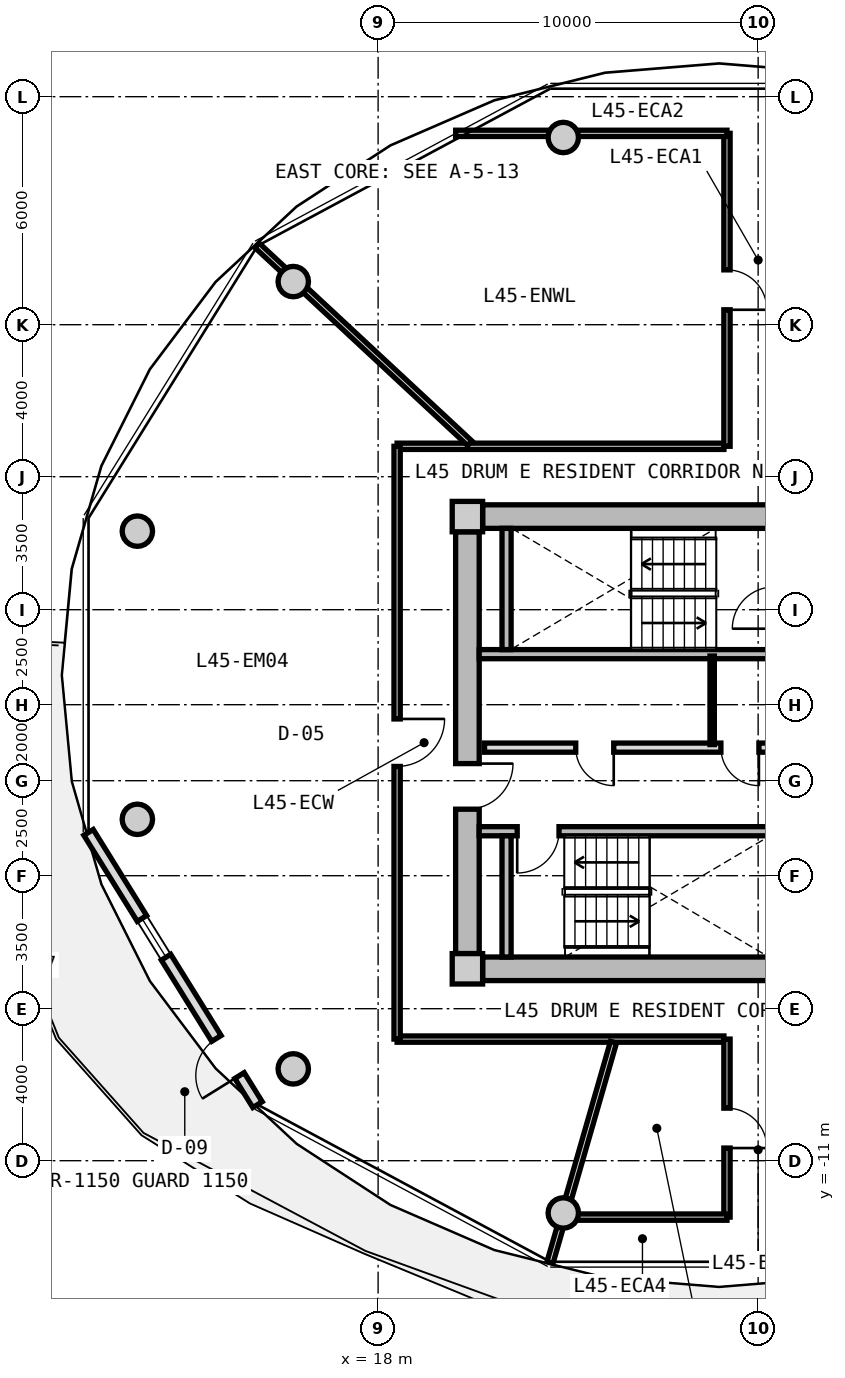
"""IFC4 building model, lengths in metres.
Left out: names, types, materials, properties, quantities, classifications, styles, units other than length and angle.
Written with IfcOpenShell. Run it as: python <this file> out.ifc"""

import sys

from ifc_helpers import new_model, si_unit, direction, frame, frame_2d, origin, origin_2d, place, context, subcontext, project, spatial, rectangle, circle, extrude, source, transform, mapped, element, fill, save


model = new_model("IFC4")
c1 = context("Model", 3, precision=1e-05, world=origin(), true_north=direction((0.0, 1.0)))
c2 = subcontext(c1, "Body", "Model", "MODEL_VIEW")
j1 = project(units=[si_unit("LENGTHUNIT", "METRE"), si_unit("PLANEANGLEUNIT", "RADIAN")], contexts=[c1])
p1 = place(None, origin())
s1 = spatial("IfcSite", under=j1, at=p1, CompositionType="ELEMENT")
p2 = place(p1, origin())
s2 = spatial("IfcBuilding", under=s1, at=p2, CompositionType="ELEMENT")
p3 = place(p2, frame((0.0, 0.0, 146.5)))
s3 = spatial("IfcBuildingStorey", under=s2, at=p3, CompositionType="ELEMENT", Elevation=146.5)
m1 = source(origin(), c2, "Body", "SweptSolid", [
    extrude(rectangle(XDim=0.8, YDim=0.8, at=origin_2d()), origin(), (0.0, 0.0, 1.0), 3.05),
])
for number, where, z_axis, x_axis in (
    (1, (20.35, -5.95, 0.0), (0.0, 0.0, 1.0), (1.0, 0.0, 0.0)),
    (2, (20.35, 5.95, 0.0), (0.0, 0.0, 1.0), (1.0, 0.0, 0.0)),
):
    element("IfcColumn", number, at=place(p3, frame(where, z_axis=z_axis, x_axis=x_axis)), inside=s3, PredefinedType="COLUMN", context=c2, shape_type="MappedRepresentation", body=[
        mapped(m1, transform((0.0, 0.0, 0.0), x_axis=(1.0, 0.0, 0.0), y_axis=(0.0, 1.0, 0.0), z_axis=(0.0, 0.0, 1.0), scale=1.0)),
    ])
m2 = source(origin(), c2, "Body", "SweptSolid", [
    extrude(rectangle(XDim=14.5, YDim=0.62, at=frame_2d((7.25, 0.0))), origin(), (0.0, 0.0, 1.0), 2.81),
])
for number, where, z_axis, x_axis in (
    (3, (20.75, 5.95, 0.0), (0.0, 0.0, 1.0), (1.0, 0.0, 0.0)),
    (4, (35.25, -5.95, 0.0), (0.0, 0.0, 1.0), (-1.0, 0.0, 0.0)),
):
    element("IfcWall", number, at=place(p3, frame(where, z_axis=z_axis, x_axis=x_axis)), inside=s3, PredefinedType="SHEAR", context=c2, shape_type="MappedRepresentation", body=[
        mapped(m2, transform((0.0, 0.0, 0.0), x_axis=(1.0, 0.0, 0.0), y_axis=(0.0, 1.0, 0.0), z_axis=(0.0, 0.0, 1.0), scale=1.0)),
    ])
m3 = source(origin(), c2, "Body", "SweptSolid", [
    extrude(rectangle(XDim=11.1, YDim=0.62, at=frame_2d((5.55, 0.0))), origin(), (0.0, 0.0, 1.0), 2.81),
])
p4 = place(p3, frame((20.35, -5.55, 0.0), z_axis=(0.0, 0.0, 1.0), x_axis=(0.0, 1.0, 0.0)))
e5 = element("IfcWall", 5, at=p4, inside=s3, PredefinedType="SHEAR", context=c2, shape_type="MappedRepresentation", body=[
    mapped(m3, transform((0.0, 0.0, 0.0), x_axis=(1.0, 0.0, 0.0), y_axis=(0.0, 1.0, 0.0), z_axis=(0.0, 0.0, 1.0), scale=1.0)),
])
p5 = place(p4, frame((3.8, 0.0, 0.0)))
e6 = element("IfcOpeningElement", 6, at=p5, cuts=e5, PredefinedType="OPENING", context=c2, shape_type="SweptSolid", body=[
    extrude(rectangle(XDim=1.2, YDim=2.15, at=frame_2d((0.6, 1.075))), frame((0.0, 0.32, 0.0), z_axis=(0.0, -1.0, 0.0), x_axis=(1.0, 0.0, 0.0)), (0.0, 0.0, 1.0), 0.64),
])
m4 = source(origin(), c2, "Body", "SweptSolid", [
    extrude(circle(Radius=0.4, at=origin_2d()), origin(), (0.0, 0.0, 1.0), 3.05),
])
for number, where, z_axis, x_axis in (
    (7, (22.873, 15.926, 0.0), (0.0, 0.0, 1.0), (1.0, 0.0, 0.0)),
    (8, (15.767, 12.135, 0.0), (0.0, 0.0, 1.0), (1.0, 0.0, 0.0)),
    (9, (11.665, 5.567, 0.0), (0.0, 0.0, 1.0), (1.0, 0.0, 0.0)),
    (10, (11.665, -2.016, 0.0), (0.0, 0.0, 1.0), (1.0, 0.0, 0.0)),
    (11, (15.767, -8.584, 0.0), (0.0, 0.0, 1.0), (1.0, 0.0, 0.0)),
    (12, (22.873, -12.375, 0.0), (0.0, 0.0, 1.0), (1.0, 0.0, 0.0)),
):
    element("IfcColumn", number, at=place(p3, frame(where, z_axis=z_axis, x_axis=x_axis)), inside=s3, PredefinedType="COLUMN", context=c2, shape_type="MappedRepresentation", body=[
        mapped(m4, transform((0.0, 0.0, 0.0), x_axis=(1.0, 0.0, 0.0), y_axis=(0.0, 1.0, 0.0), z_axis=(0.0, 0.0, 1.0), scale=1.0)),
    ])
m5 = source(origin(), c2, "Body", "SweptSolid", [
    extrude(rectangle(XDim=8.431, YDim=0.29, at=frame_2d((4.216, 0.0))), origin(), (0.0, 0.0, 1.0), 2.81),
])
p6 = place(p3, frame((14.827, -9.524, 0.0), z_axis=(0.0, 0.0, 1.0), x_axis=(-0.527377998418, 0.849630770855, 0.0)))
e13 = element("IfcWall", 13, at=p6, inside=s3, PredefinedType="SOLIDWALL", context=c2, shape_type="MappedRepresentation", body=[
    mapped(m5, transform((0.0, 0.0, 0.0), x_axis=(1.0, 0.0, 0.0), y_axis=(0.0, 1.0, 0.0), z_axis=(0.0, 0.0, 1.0), scale=1.0)),
])
p7 = place(p6, frame((0.9, 0.0, 0.0)))
e14 = element("IfcOpeningElement", 14, at=p7, cuts=e13, PredefinedType="OPENING", context=c2, shape_type="SweptSolid", body=[
    extrude(rectangle(XDim=1.15, YDim=2.25, at=frame_2d((0.575, 1.125))), frame((0.0, 0.155, 0.0), z_axis=(0.0, -1.0, 0.0), x_axis=(1.0, 0.0, 0.0)), (0.0, 0.0, 1.0), 0.31),
])
p8 = place(p6, frame((4.566, 0.0, 0.85)))
e15 = element("IfcOpeningElement", 15, at=p8, cuts=e13, PredefinedType="OPENING", context=c2, shape_type="SweptSolid", body=[
    extrude(rectangle(XDim=1.2, YDim=1.5, at=frame_2d((0.6, 0.75))), frame((0.0, 0.155, 0.0), z_axis=(0.0, -1.0, 0.0), x_axis=(1.0, 0.0, 0.0)), (0.0, 0.0, 1.0), 0.31),
])
m6 = source(origin(), c2, "Body", "SweptSolid", [
    extrude(rectangle(XDim=7.88, YDim=0.24, at=frame_2d((3.94, 0.0))), origin(), (0.0, 0.0, 1.0), 2.81),
])
p9 = place(p3, frame((20.66, 2.33, 0.0), z_axis=(0.0, 0.0, 1.0), x_axis=(1.0, 0.0, 0.0)))
e16 = element("IfcWall", 16, at=p9, inside=s3, PredefinedType="PARTITIONING", context=c2, shape_type="MappedRepresentation", body=[
    mapped(m6, transform((0.0, 0.0, 0.0), x_axis=(1.0, 0.0, 0.0), y_axis=(0.0, 1.0, 0.0), z_axis=(0.0, 0.0, 1.0), scale=1.0)),
])
m7 = source(origin(), c2, "Body", "SweptSolid", [
    extrude(rectangle(XDim=3.19, YDim=0.24, at=frame_2d((1.595, 0.0))), origin(), (0.0, 0.0, 1.0), 2.81),
])
p10 = place(p3, frame((21.38, 2.45, 0.0), z_axis=(0.0, 0.0, 1.0), x_axis=(0.0, 1.0, 0.0)))
e17 = element("IfcWall", 17, at=p10, inside=s3, PredefinedType="PARTITIONING", context=c2, shape_type="MappedRepresentation", body=[
    mapped(m7, transform((0.0, 0.0, 0.0), x_axis=(1.0, 0.0, 0.0), y_axis=(0.0, 1.0, 0.0), z_axis=(0.0, 0.0, 1.0), scale=1.0)),
])
p11 = place(p3, frame((20.66, -2.33, 0.0), z_axis=(0.0, 0.0, 1.0), x_axis=(1.0, 0.0, 0.0)))
e18 = element("IfcWall", 18, at=p11, inside=s3, PredefinedType="PARTITIONING", context=c2, shape_type="MappedRepresentation", body=[
    mapped(m6, transform((0.0, 0.0, 0.0), x_axis=(1.0, 0.0, 0.0), y_axis=(0.0, 1.0, 0.0), z_axis=(0.0, 0.0, 1.0), scale=1.0)),
])
p12 = place(p11, frame((1.0, 0.0, 0.0)))
e19 = element("IfcOpeningElement", 19, at=p12, cuts=e18, PredefinedType="OPENING", context=c2, shape_type="SweptSolid", body=[
    extrude(rectangle(XDim=1.1, YDim=2.15, at=frame_2d((0.55, 1.075))), frame((0.0, 0.13, 0.0), z_axis=(0.0, -1.0, 0.0), x_axis=(1.0, 0.0, 0.0)), (0.0, 0.0, 1.0), 0.26),
])
p13 = place(p3, frame((21.38, -5.64, 0.0), z_axis=(0.0, 0.0, 1.0), x_axis=(0.0, 1.0, 0.0)))
e20 = element("IfcWall", 20, at=p13, inside=s3, PredefinedType="PARTITIONING", context=c2, shape_type="MappedRepresentation", body=[
    mapped(m7, transform((0.0, 0.0, 0.0), x_axis=(1.0, 0.0, 0.0), y_axis=(0.0, 1.0, 0.0), z_axis=(0.0, 0.0, 1.0), scale=1.0)),
])
m8 = source(origin(), c2, "Body", "SweptSolid", [
    extrude(rectangle(XDim=7.62, YDim=0.24, at=frame_2d((3.81, 0.0))), origin(), (0.0, 0.0, 1.0), 2.795),
])
p14 = place(p3, frame((20.8, -0.13, 0.0), z_axis=(0.0, 0.0, 1.0), x_axis=(1.0, 0.0, 0.0)))
e21 = element("IfcWall", 21, at=p14, inside=s3, PredefinedType="PARTITIONING", context=c2, shape_type="MappedRepresentation", body=[
    mapped(m8, transform((0.0, 0.0, 0.0), x_axis=(1.0, 0.0, 0.0), y_axis=(0.0, 1.0, 0.0), z_axis=(0.0, 0.0, 1.0), scale=1.0)),
])
p15 = place(p14, frame((6.22, 0.0, 0.0)))
e22 = element("IfcOpeningElement", 22, at=p15, cuts=e21, PredefinedType="OPENING", context=c2, shape_type="SweptSolid", body=[
    extrude(rectangle(XDim=1.0, YDim=2.1, at=frame_2d((0.5, 1.05))), frame((0.0, 0.13, 0.0), z_axis=(0.0, -1.0, 0.0), x_axis=(1.0, 0.0, 0.0)), (0.0, 0.0, 1.0), 0.26),
])
p16 = place(p14, frame((2.4, 0.0, 0.0)))
e23 = element("IfcOpeningElement", 23, at=p16, cuts=e21, PredefinedType="OPENING", context=c2, shape_type="SweptSolid", body=[
    extrude(rectangle(XDim=1.0, YDim=2.1, at=frame_2d((0.5, 1.05))), frame((0.0, 0.13, 0.0), z_axis=(0.0, -1.0, 0.0), x_axis=(1.0, 0.0, 0.0)), (0.0, 0.0, 1.0), 0.26),
])
m9 = source(origin(), c2, "Body", "SweptSolid", [
    extrude(rectangle(XDim=2.33, YDim=0.115, at=frame_2d((1.165, 0.0))), origin(), (0.0, 0.0, 1.0), 2.795),
])
p17 = place(p3, frame((26.79, -0.05, 0.0), z_axis=(0.0, 0.0, 1.0), x_axis=(0.0, 1.0, 0.0)))
e24 = element("IfcWall", 24, at=p17, inside=s3, PredefinedType="PARTITIONING", context=c2, shape_type="MappedRepresentation", body=[
    mapped(m9, transform((0.0, 0.0, 0.0), x_axis=(1.0, 0.0, 0.0), y_axis=(0.0, 1.0, 0.0), z_axis=(0.0, 0.0, 1.0), scale=1.0)),
])
m10 = source(origin(), c2, "Body", "SweptSolid", [
    extrude(rectangle(XDim=8.6, YDim=0.165, at=frame_2d((4.3, 0.0))), origin(), (0.0, 0.0, 1.0), 2.795),
])
for number, where, z_axis, x_axis in (
    (25, (18.5, 7.8, 0.0), (0.0, 0.0, 1.0), (1.0, 0.0, 0.0)),
    (26, (27.1, -7.8, 0.0), (0.0, 0.0, 1.0), (-1.0, 0.0, 0.0)),
):
    element("IfcWall", number, at=place(p3, frame(where, z_axis=z_axis, x_axis=x_axis)), inside=s3, PredefinedType="PARTITIONING", context=c2, shape_type="MappedRepresentation", body=[
        mapped(m10, transform((0.0, 0.0, 0.0), x_axis=(1.0, 0.0, 0.0), y_axis=(0.0, 1.0, 0.0), z_axis=(0.0, 0.0, 1.0), scale=1.0)),
    ])
m11 = source(origin(), c2, "Body", "SweptSolid", [
    extrude(rectangle(XDim=15.6, YDim=0.165, at=frame_2d((7.8, 0.0))), origin(), (0.0, 0.0, 1.0), 2.795),
])
p18 = place(p3, frame((18.5, -7.8, 0.0), z_axis=(0.0, 0.0, 1.0), x_axis=(0.0, 1.0, 0.0)))
e27 = element("IfcWall", 27, at=p18, inside=s3, PredefinedType="PARTITIONING", context=c2, shape_type="MappedRepresentation", body=[
    mapped(m11, transform((0.0, 0.0, 0.0), x_axis=(1.0, 0.0, 0.0), y_axis=(0.0, 1.0, 0.0), z_axis=(0.0, 0.0, 1.0), scale=1.0)),
])
p19 = place(p18, frame((7.175, 0.0, 0.0)))
e28 = element("IfcOpeningElement", 28, at=p19, cuts=e27, PredefinedType="OPENING", context=c2, shape_type="SweptSolid", body=[
    extrude(rectangle(XDim=1.25, YDim=2.2, at=frame_2d((0.625, 1.1))), frame((0.0, 0.093, 0.0), z_axis=(0.0, -1.0, 0.0), x_axis=(1.0, 0.0, 0.0)), (0.0, 0.0, 1.0), 0.185),
])
m12 = source(origin(), c2, "Body", "SweptSolid", [
    extrude(rectangle(XDim=7.648, YDim=0.165, at=frame_2d((3.824, 0.0))), origin(), (0.0, 0.0, 1.0), 2.345),
])
p20 = place(p3, frame((20.413, 7.88, 0.0), z_axis=(0.0, 0.0, 1.0), x_axis=(-0.732182665826, 0.681108320213, 0.0)))
e29 = element("IfcWall", 29, at=p20, inside=s3, PredefinedType="PARTITIONING", context=c2, shape_type="MappedRepresentation", body=[
    mapped(m12, transform((0.0, 0.0, 0.0), x_axis=(1.0, 0.0, 0.0), y_axis=(0.0, 1.0, 0.0), z_axis=(0.0, 0.0, 1.0), scale=1.0)),
])
m13 = source(origin(), c2, "Body", "SweptSolid", [
    extrude(rectangle(XDim=6.035, YDim=0.165, at=frame_2d((3.018, 0.0))), origin(), (0.0, 0.0, 1.0), 2.345),
])
p21 = place(p3, frame((24.194, -7.88, 0.0), z_axis=(0.0, 0.0, 1.0), x_axis=(-0.276809454862, -0.960924828329, 0.0)))
e30 = element("IfcWall", 30, at=p21, inside=s3, PredefinedType="PARTITIONING", context=c2, shape_type="MappedRepresentation", body=[
    mapped(m13, transform((0.0, 0.0, 0.0), x_axis=(1.0, 0.0, 0.0), y_axis=(0.0, 1.0, 0.0), z_axis=(0.0, 0.0, 1.0), scale=1.0)),
])
m14 = source(origin(), c2, "Body", "SweptSolid", [
    extrude(rectangle(XDim=8.235, YDim=0.165, at=frame_2d((4.118, 0.0))), origin(), (0.0, 0.0, 1.0), 2.795),
])
p22 = place(p3, frame((27.18, 7.8, 0.0), z_axis=(0.0, 0.0, 1.0), x_axis=(0.0, 1.0, 0.0)))
e31 = element("IfcWall", 31, at=p22, inside=s3, PredefinedType="PARTITIONING", context=c2, shape_type="MappedRepresentation", body=[
    mapped(m14, transform((0.0, 0.0, 0.0), x_axis=(1.0, 0.0, 0.0), y_axis=(0.0, 1.0, 0.0), z_axis=(0.0, 0.0, 1.0), scale=1.0)),
])
p23 = place(p22, frame((3.593, 0.0, 0.0)))
e32 = element("IfcOpeningElement", 32, at=p23, cuts=e31, PredefinedType="OPENING", context=c2, shape_type="SweptSolid", body=[
    extrude(rectangle(XDim=1.05, YDim=2.15, at=frame_2d((0.525, 1.075))), frame((0.0, 0.093, 0.0), z_axis=(0.0, -1.0, 0.0), x_axis=(1.0, 0.0, 0.0)), (0.0, 0.0, 1.0), 0.185),
])
m15 = source(origin(), c2, "Body", "SweptSolid", [
    extrude(rectangle(XDim=7.139, YDim=0.165, at=frame_2d((3.569, 0.0))), origin(), (0.0, 0.0, 1.0), 2.345),
])
p24 = place(p3, frame((20.041, 16.035, 0.0), z_axis=(0.0, 0.0, 1.0), x_axis=(1.0, 0.0, 0.0)))
e33 = element("IfcWall", 33, at=p24, inside=s3, PredefinedType="PARTITIONING", context=c2, shape_type="MappedRepresentation", body=[
    mapped(m15, transform((0.0, 0.0, 0.0), x_axis=(1.0, 0.0, 0.0), y_axis=(0.0, 1.0, 0.0), z_axis=(0.0, 0.0, 1.0), scale=1.0)),
])
m16 = source(origin(), c2, "Body", "SweptSolid", [
    extrude(rectangle(XDim=4.685, YDim=0.165, at=frame_2d((2.342, 0.0))), origin(), (0.0, 0.0, 1.0), 2.795),
])
p25 = place(p3, frame((27.18, -12.485, 0.0), z_axis=(0.0, 0.0, 1.0), x_axis=(0.0, 1.0, 0.0)))
e34 = element("IfcWall", 34, at=p25, inside=s3, PredefinedType="PARTITIONING", context=c2, shape_type="MappedRepresentation", body=[
    mapped(m16, transform((0.0, 0.0, 0.0), x_axis=(1.0, 0.0, 0.0), y_axis=(0.0, 1.0, 0.0), z_axis=(0.0, 0.0, 1.0), scale=1.0)),
])
p26 = place(p25, frame((1.817, 0.0, 0.0)))
e35 = element("IfcOpeningElement", 35, at=p26, cuts=e34, PredefinedType="OPENING", context=c2, shape_type="SweptSolid", body=[
    extrude(rectangle(XDim=1.05, YDim=2.15, at=frame_2d((0.525, 1.075))), frame((0.0, 0.093, 0.0), z_axis=(0.0, -1.0, 0.0), x_axis=(1.0, 0.0, 0.0)), (0.0, 0.0, 1.0), 0.185),
])
m17 = source(origin(), c2, "Body", "SweptSolid", [
    extrude(rectangle(XDim=4.469, YDim=0.165, at=frame_2d((2.234, 0.0))), origin(), (0.0, 0.0, 1.0), 2.345),
])
p27 = place(p3, frame((22.711, -12.485, 0.0), z_axis=(0.0, 0.0, 1.0), x_axis=(1.0, 0.0, 0.0)))
e36 = element("IfcWall", 36, at=p27, inside=s3, PredefinedType="PARTITIONING", context=c2, shape_type="MappedRepresentation", body=[
    mapped(m17, transform((0.0, 0.0, 0.0), x_axis=(1.0, 0.0, 0.0), y_axis=(0.0, 1.0, 0.0), z_axis=(0.0, 0.0, 1.0), scale=1.0)),
])
m18 = source(origin(), c2, "Body", "SweptSolid", [
    extrude(rectangle(XDim=1.15, YDim=2.25, at=frame_2d((0.575, 1.125))), frame((0.0, 0.025, 0.0), z_axis=(0.0, -1.0, 0.0), x_axis=(1.0, 0.0, 0.0)), (0.0, 0.0, 1.0), 0.05),
])
p28 = place(p7, origin())
e37 = element("IfcDoor", 37, at=p28, inside=s3, OperationType="SINGLE_SWING_LEFT", PredefinedType="DOOR", context=c2, shape_type="MappedRepresentation", body=[
    mapped(m18, transform((0.0, 0.0, 0.0), x_axis=(1.0, 0.0, 0.0), y_axis=(0.0, 1.0, 0.0), z_axis=(0.0, 0.0, 1.0), scale=1.0)),
])
fill(e14, e37)
m19 = source(origin(), c2, "Body", "SweptSolid", [
    extrude(rectangle(XDim=1.2, YDim=1.5, at=frame_2d((0.6, 0.75))), frame((0.0, 0.03, 0.0), z_axis=(0.0, -1.0, 0.0), x_axis=(1.0, 0.0, 0.0)), (0.0, 0.0, 1.0), 0.06),
])
p29 = place(p8, origin())
e38 = element("IfcWindow", 38, at=p29, inside=s3, PartitioningType="SINGLE_PANEL", PredefinedType="WINDOW", context=c2, shape_type="MappedRepresentation", body=[
    mapped(m19, transform((0.0, 0.0, 0.0), x_axis=(1.0, 0.0, 0.0), y_axis=(0.0, 1.0, 0.0), z_axis=(0.0, 0.0, 1.0), scale=1.0)),
])
fill(e15, e38)
m20 = source(origin(), c2, "Body", "SweptSolid", [
    extrude(rectangle(XDim=1.1, YDim=2.15, at=frame_2d((0.55, 1.075))), frame((0.0, 0.025, 0.0), z_axis=(0.0, -1.0, 0.0), x_axis=(1.0, 0.0, 0.0)), (0.0, 0.0, 1.0), 0.05),
])
p30 = place(p12, frame((1.1, 0.0, 0.0), z_axis=(0.0, 0.0, 1.0), x_axis=(-1.0, 0.0, 0.0)))
e39 = element("IfcDoor", 39, at=p30, inside=s3, OperationType="SINGLE_SWING_RIGHT", PredefinedType="DOOR", context=c2, shape_type="MappedRepresentation", body=[
    mapped(m20, transform((0.0, 0.0, 0.0), x_axis=(1.0, 0.0, 0.0), y_axis=(0.0, 1.0, 0.0), z_axis=(0.0, 0.0, 1.0), scale=1.0)),
])
fill(e19, e39)
m21 = source(origin(), c2, "Body", "SweptSolid", [
    extrude(rectangle(XDim=1.2, YDim=2.15, at=frame_2d((0.6, 1.075))), frame((0.0, 0.025, 0.0), z_axis=(0.0, -1.0, 0.0), x_axis=(1.0, 0.0, 0.0)), (0.0, 0.0, 1.0), 0.05),
])
p31 = place(p5, frame((1.2, 0.0, 0.0), z_axis=(0.0, 0.0, 1.0), x_axis=(-1.0, 0.0, 0.0)))
e40 = element("IfcDoor", 40, at=p31, inside=s3, OperationType="SINGLE_SWING_LEFT", PredefinedType="DOOR", context=c2, shape_type="MappedRepresentation", body=[
    mapped(m21, transform((0.0, 0.0, 0.0), x_axis=(1.0, 0.0, 0.0), y_axis=(0.0, 1.0, 0.0), z_axis=(0.0, 0.0, 1.0), scale=1.0)),
])
fill(e6, e40)
m22 = source(origin(), c2, "Body", "SweptSolid", [
    extrude(rectangle(XDim=1.0, YDim=2.1, at=frame_2d((0.5, 1.05))), frame((0.0, 0.025, 0.0), z_axis=(0.0, -1.0, 0.0), x_axis=(1.0, 0.0, 0.0)), (0.0, 0.0, 1.0), 0.05),
])
p32 = place(p15, frame((1.0, 0.0, 0.0), z_axis=(0.0, 0.0, 1.0), x_axis=(-1.0, 0.0, 0.0)))
e41 = element("IfcDoor", 41, at=p32, inside=s3, OperationType="SINGLE_SWING_LEFT", PredefinedType="DOOR", context=c2, shape_type="MappedRepresentation", body=[
    mapped(m22, transform((0.0, 0.0, 0.0), x_axis=(1.0, 0.0, 0.0), y_axis=(0.0, 1.0, 0.0), z_axis=(0.0, 0.0, 1.0), scale=1.0)),
])
fill(e22, e41)
p33 = place(p16, frame((1.0, 0.0, 0.0), z_axis=(0.0, 0.0, 1.0), x_axis=(-1.0, 0.0, 0.0)))
e42 = element("IfcDoor", 42, at=p33, inside=s3, OperationType="SINGLE_SWING_LEFT", PredefinedType="DOOR", context=c2, shape_type="MappedRepresentation", body=[
    mapped(m22, transform((0.0, 0.0, 0.0), x_axis=(1.0, 0.0, 0.0), y_axis=(0.0, 1.0, 0.0), z_axis=(0.0, 0.0, 1.0), scale=1.0)),
])
fill(e23, e42)
m23 = source(origin(), c2, "Body", "SweptSolid", [
    extrude(rectangle(XDim=1.05, YDim=2.15, at=frame_2d((0.525, 1.075))), frame((0.0, 0.025, 0.0), z_axis=(0.0, -1.0, 0.0), x_axis=(1.0, 0.0, 0.0)), (0.0, 0.0, 1.0), 0.05),
])
p34 = place(p23, frame((1.05, 0.0, 0.0), z_axis=(0.0, 0.0, 1.0), x_axis=(-1.0, 0.0, 0.0)))
e43 = element("IfcDoor", 43, at=p34, inside=s3, OperationType="SINGLE_SWING_RIGHT", PredefinedType="DOOR", context=c2, shape_type="MappedRepresentation", body=[
    mapped(m23, transform((0.0, 0.0, 0.0), x_axis=(1.0, 0.0, 0.0), y_axis=(0.0, 1.0, 0.0), z_axis=(0.0, 0.0, 1.0), scale=1.0)),
])
fill(e32, e43)
p35 = place(p26, frame((1.05, 0.0, 0.0), z_axis=(0.0, 0.0, 1.0), x_axis=(-1.0, 0.0, 0.0)))
e44 = element("IfcDoor", 44, at=p35, inside=s3, OperationType="SINGLE_SWING_RIGHT", PredefinedType="DOOR", context=c2, shape_type="MappedRepresentation", body=[
    mapped(m23, transform((0.0, 0.0, 0.0), x_axis=(1.0, 0.0, 0.0), y_axis=(0.0, 1.0, 0.0), z_axis=(0.0, 0.0, 1.0), scale=1.0)),
])
fill(e35, e44)
m24 = source(origin(), c2, "Body", "SweptSolid", [
    extrude(rectangle(XDim=1.25, YDim=2.2, at=frame_2d((0.625, 1.1))), frame((0.0, 0.025, 0.0), z_axis=(0.0, -1.0, 0.0), x_axis=(1.0, 0.0, 0.0)), (0.0, 0.0, 1.0), 0.05),
])
p36 = place(p19, frame((1.25, 0.0, 0.0), z_axis=(0.0, 0.0, 1.0), x_axis=(-1.0, 0.0, 0.0)))
e45 = element("IfcDoor", 45, at=p36, inside=s3, OperationType="SINGLE_SWING_LEFT", PredefinedType="DOOR", context=c2, shape_type="MappedRepresentation", body=[
    mapped(m24, transform((0.0, 0.0, 0.0), x_axis=(1.0, 0.0, 0.0), y_axis=(0.0, 1.0, 0.0), z_axis=(0.0, 0.0, 1.0), scale=1.0)),
])
fill(e28, e45)
save(model, sys.argv[1])
